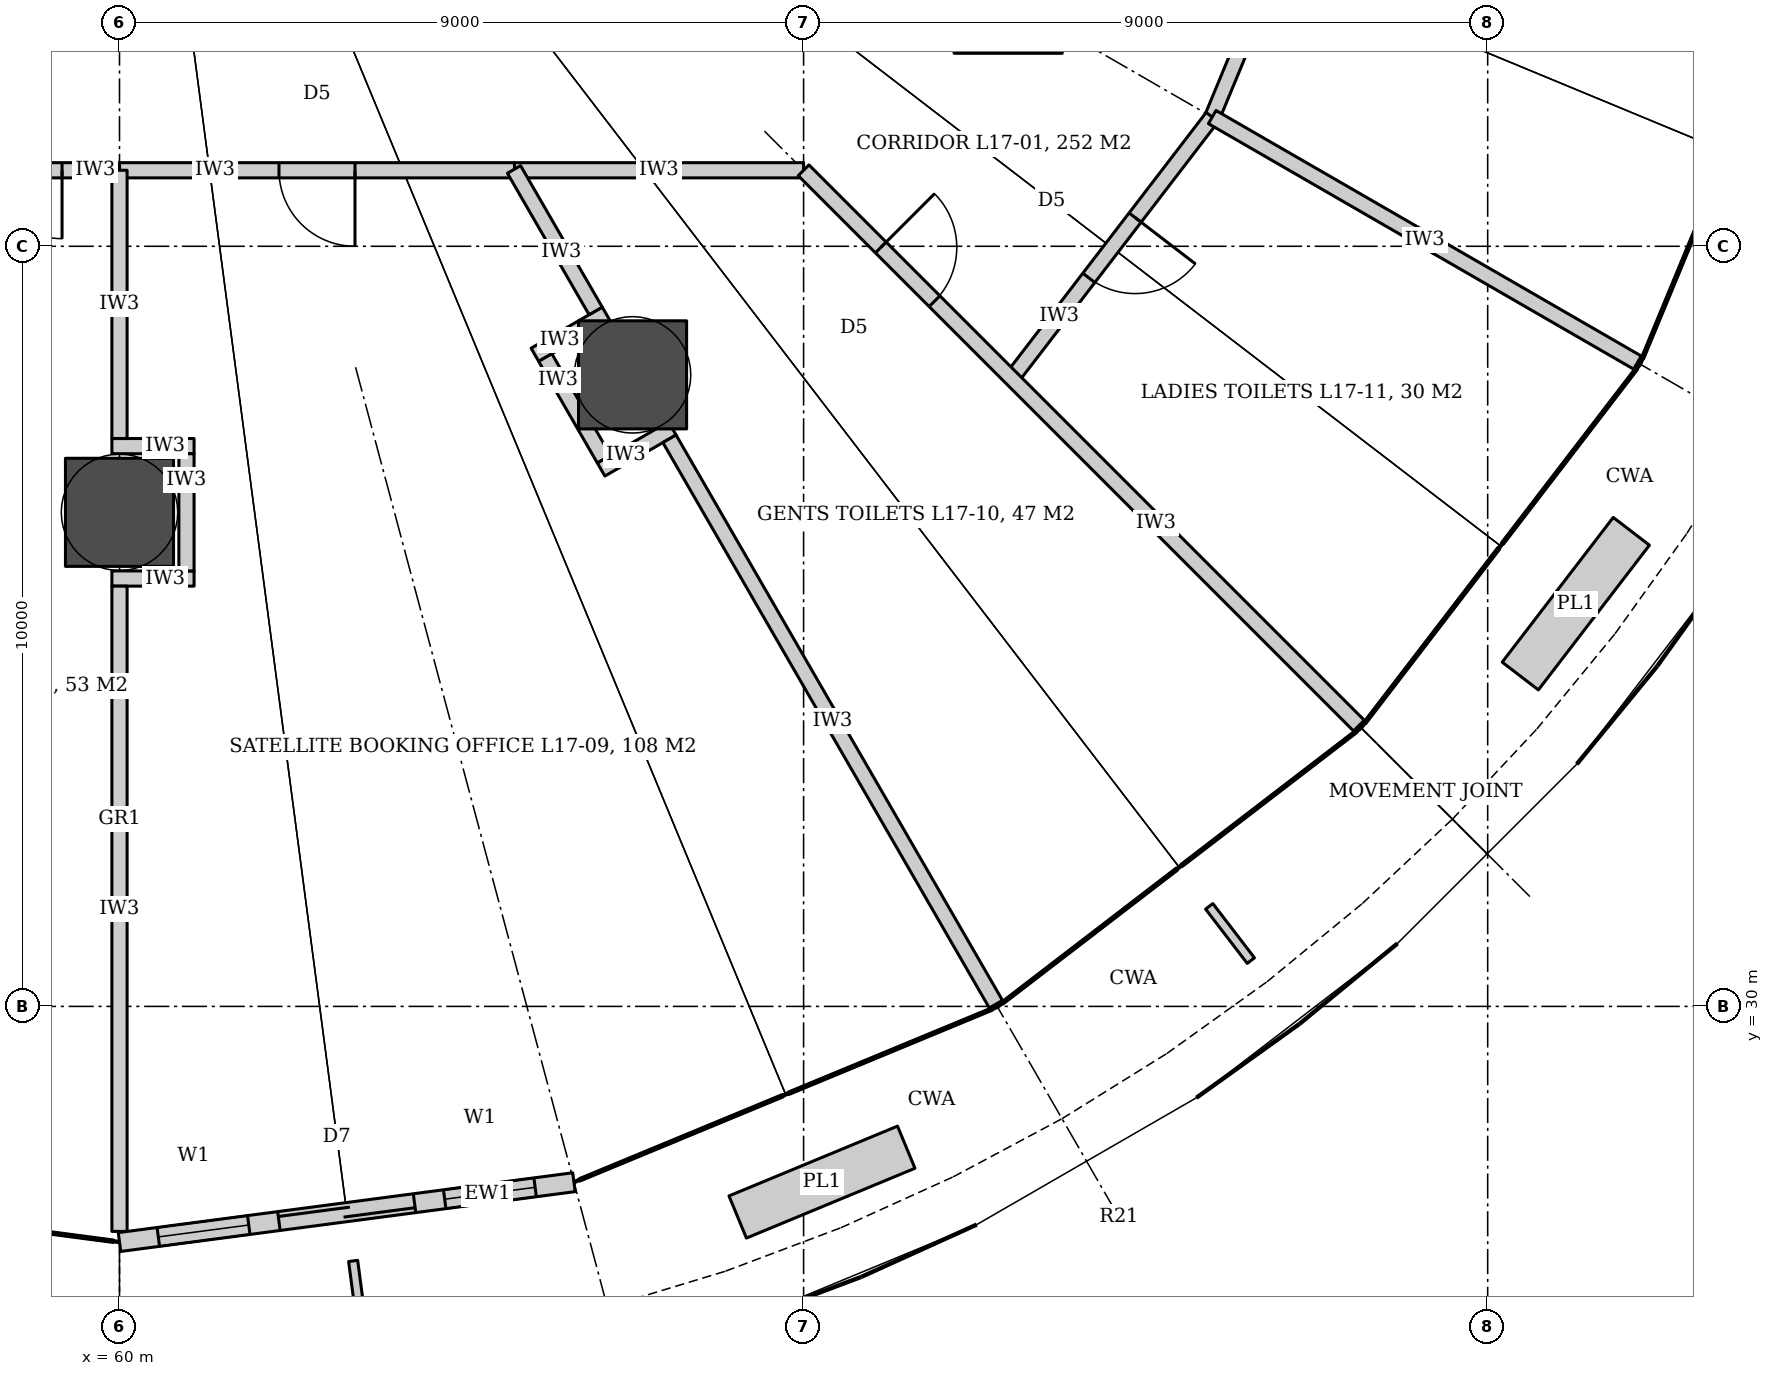
"""IFC4 building model, lengths in metres.
Left out: names, types, materials, properties, quantities, classifications, styles, units other than length and angle.
Written with IfcOpenShell. Run it as: python <this file> out.ifc"""

import sys

from ifc_helpers import new_model, si_unit, direction, frame, frame_2d, origin, origin_2d, place, context, subcontext, project, spatial, rectangle, hollow_circle, extrude, element, fill, save


model = new_model("IFC4")
c1 = context("Model", 3, precision=1e-05, world=origin(), true_north=direction((0.0, 1.0)))
c2 = subcontext(c1, "Body", "Model", "MODEL_VIEW")
j1 = project(units=[si_unit("LENGTHUNIT", "METRE"), si_unit("PLANEANGLEUNIT", "RADIAN")], contexts=[c1])
p1 = place(None, origin())
s1 = spatial("IfcSite", under=j1, at=p1, CompositionType="ELEMENT")
p2 = place(p1, origin())
s2 = spatial("IfcBuilding", under=s1, at=p2, CompositionType="ELEMENT")
p3 = place(p2, frame((0.0, 0.0, 80.6)))
s3 = spatial("IfcBuildingStorey", under=s2, at=p3, CompositionType="ELEMENT", Elevation=80.6)
for number, where, z_axis, x_axis in (
    (1, (60.0, 36.5, 0.0), (0.0, 0.0, 1.0), (1.0, 0.0, 0.0)),
    (2, (66.75, 38.309, 0.0), (0.0, 0.0, 1.0), (1.0, 0.0, 0.0)),
    (3, (71.691, 43.25, 0.0), (0.0, 0.0, 1.0), (1.0, 0.0, 0.0)),
):
    element("IfcColumn", number, at=place(p3, frame(where, z_axis=z_axis, x_axis=x_axis)), inside=s3, PredefinedType="COLUMN", context=c2, shape_type="SweptSolid", body=[
        extrude(hollow_circle(Radius=0.711, WallThickness=0.07, at=origin_2d()), origin(), (0.0, 0.0, 1.0), 4.2),
    ])
p4 = place(p3, frame((76.034, 45.704, 0.0), z_axis=(0.0, 0.0, 1.0), x_axis=(-0.382698425325, -0.923873322082, 0.0)))
e4 = element("IfcWall", 4, at=p4, inside=s3, PredefinedType="PARTITIONING", context=c2, shape_type="SweptSolid", body=[
    extrude(rectangle(XDim=4.333, YDim=0.2, at=frame_2d((2.167, 0.0))), origin(), (0.0, 0.0, 1.0), 3.04),
])
p5 = place(p4, frame((1.667, 0.0, 0.0)))
e5 = element("IfcOpeningElement", 5, at=p5, cuts=e4, PredefinedType="OPENING", context=c2, shape_type="SweptSolid", body=[
    extrude(rectangle(XDim=1.0, YDim=2.1, at=frame_2d((0.5, 1.05))), frame((0.0, 0.11, 0.0), z_axis=(0.0, -1.0, 0.0), x_axis=(1.0, 0.0, 0.0)), (0.0, 0.0, 1.0), 0.22),
])
p6 = place(p3, frame((74.376, 41.7, 0.0), z_axis=(0.0, 0.0, 1.0), x_axis=(-0.60874374674, -0.79336690806, 0.0)))
e6 = element("IfcWall", 6, at=p6, inside=s3, PredefinedType="PARTITIONING", context=c2, shape_type="SweptSolid", body=[
    extrude(rectangle(XDim=4.333, YDim=0.2, at=frame_2d((2.167, 0.0))), origin(), (0.0, 0.0, 1.0), 3.04),
])
p7 = place(p6, frame((1.667, 0.0, 0.0)))
e7 = element("IfcOpeningElement", 7, at=p7, cuts=e6, PredefinedType="OPENING", context=c2, shape_type="SweptSolid", body=[
    extrude(rectangle(XDim=1.0, YDim=2.1, at=frame_2d((0.5, 1.05))), frame((0.0, 0.11, 0.0), z_axis=(0.0, -1.0, 0.0), x_axis=(1.0, 0.0, 0.0)), (0.0, 0.0, 1.0), 0.22),
])
p8 = place(p3, frame((69.0, 41.0, 0.0), z_axis=(0.0, 0.0, 1.0), x_axis=(-1.0, 0.0, 0.0)))
e8 = element("IfcWall", 8, at=p8, inside=s3, PredefinedType="PARTITIONING", context=c2, shape_type="SweptSolid", body=[
    extrude(rectangle(XDim=3.804, YDim=0.2, at=frame_2d((1.902, 0.0))), origin(), (0.0, 0.0, 1.0), 3.02),
])
p9 = place(p3, frame((65.196, 41.0, 0.0), z_axis=(0.0, 0.0, 1.0), x_axis=(-1.0, 0.0, 0.0)))
e9 = element("IfcWall", 9, at=p9, inside=s3, PredefinedType="PARTITIONING", context=c2, shape_type="SweptSolid", body=[
    extrude(rectangle(XDim=5.196, YDim=0.2, at=frame_2d((2.598, 0.0))), origin(), (0.0, 0.0, 1.0), 3.04),
])
p10 = place(p9, frame((2.098, 0.0, 0.0)))
e10 = element("IfcOpeningElement", 10, at=p10, cuts=e9, PredefinedType="OPENING", context=c2, shape_type="SweptSolid", body=[
    extrude(rectangle(XDim=1.0, YDim=2.1, at=frame_2d((0.5, 1.05))), frame((0.0, 0.11, 0.0), z_axis=(0.0, -1.0, 0.0), x_axis=(1.0, 0.0, 0.0)), (0.0, 0.0, 1.0), 0.22),
])
p11 = place(p3, frame((60.0, 41.0, 0.0), z_axis=(0.0, 0.0, 1.0), x_axis=(-1.0, 0.0, 0.0)))
e11 = element("IfcWall", 11, at=p11, inside=s3, PredefinedType="PARTITIONING", context=c2, shape_type="SweptSolid", body=[
    extrude(rectangle(XDim=2.412, YDim=0.2, at=frame_2d((1.206, 0.0))), origin(), (0.0, 0.0, 1.0), 3.04),
])
p12 = place(p11, frame((0.756, 0.0, 0.0)))
e12 = element("IfcOpeningElement", 12, at=p12, cuts=e11, PredefinedType="OPENING", context=c2, shape_type="SweptSolid", body=[
    extrude(rectangle(XDim=0.9, YDim=2.4, at=frame_2d((0.45, 1.2))), frame((0.0, 0.11, 0.0), z_axis=(0.0, -1.0, 0.0), x_axis=(1.0, 0.0, 0.0)), (0.0, 0.0, 1.0), 0.22),
])
for number, where, z_axis, x_axis in (
    (13, (59.9, 37.371, 0.0), (0.0, 0.0, 1.0), (1.0, 0.0, 0.0)),
    (14, (59.9, 35.629, 0.0), (0.0, 0.0, 1.0), (1.0, 0.0, 0.0)),
):
    element("IfcWall", number, at=place(p3, frame(where, z_axis=z_axis, x_axis=x_axis)), inside=s3, PredefinedType="PARTITIONING", context=c2, shape_type="SweptSolid", body=[
        extrude(rectangle(XDim=1.081, YDim=0.2, at=frame_2d((0.541, 0.0))), origin(), (0.0, 0.0, 1.0), 3.02),
    ])
p13 = place(p3, frame((60.881, 37.271, 0.0), z_axis=(0.0, 0.0, 1.0), x_axis=(0.0, -1.0, 0.0)))
e15 = element("IfcWall", 15, at=p13, inside=s3, PredefinedType="PARTITIONING", context=c2, shape_type="SweptSolid", body=[
    extrude(rectangle(XDim=1.542, YDim=0.2, at=frame_2d((0.771, 0.0))), origin(), (0.0, 0.0, 1.0), 3.02),
])
p14 = place(p3, frame((60.0, 41.0, 0.0), z_axis=(0.0, 0.0, 1.0), x_axis=(0.0, -1.0, 0.0)))
e16 = element("IfcWall", 16, at=p14, inside=s3, PredefinedType="PARTITIONING", context=c2, shape_type="SweptSolid", body=[
    extrude(rectangle(XDim=3.529, YDim=0.2, at=frame_2d((1.765, 0.0))), origin(), (0.0, 0.0, 1.0), 3.04),
])
p15 = place(p3, frame((60.0, 35.529, 0.0), z_axis=(0.0, 0.0, 1.0), x_axis=(0.0, -1.0, 0.0)))
e17 = element("IfcWall", 17, at=p15, inside=s3, PredefinedType="PARTITIONING", context=c2, shape_type="SweptSolid", body=[
    extrude(rectangle(XDim=8.489, YDim=0.2, at=frame_2d((4.245, 0.0))), origin(), (0.0, 0.0, 1.0), 3.04),
])
for number, where, z_axis, x_axis in (
    (18, (66.401, 39.113, 0.0), (0.0, 0.0, 1.0), (-0.866, -0.5, 0.0)),
    (19, (67.272, 37.604, 0.0), (0.0, 0.0, 1.0), (-0.866, -0.5, 0.0)),
):
    element("IfcWall", number, at=place(p3, frame(where, z_axis=z_axis, x_axis=x_axis)), inside=s3, PredefinedType="PARTITIONING", context=c2, shape_type="SweptSolid", body=[
        extrude(rectangle(XDim=1.081, YDim=0.2, at=frame_2d((0.541, 0.0))), origin(), (0.0, 0.0, 1.0), 3.02),
    ])
p16 = place(p3, frame((65.602, 38.536, 0.0), z_axis=(0.0, 0.0, 1.0), x_axis=(0.499987416453, -0.866032668777, 0.0)))
e20 = element("IfcWall", 20, at=p16, inside=s3, PredefinedType="PARTITIONING", context=c2, shape_type="SweptSolid", body=[
    extrude(rectangle(XDim=1.542, YDim=0.2, at=frame_2d((0.771, 0.0))), origin(), (0.0, 0.0, 1.0), 3.02),
])
p17 = place(p3, frame((65.19, 41.011, 0.0), z_axis=(0.0, 0.0, 1.0), x_axis=(0.499987977232, -0.866032345022, 0.0)))
e21 = element("IfcWall", 21, at=p17, inside=s3, PredefinedType="PARTITIONING", context=c2, shape_type="SweptSolid", body=[
    extrude(rectangle(XDim=2.149, YDim=0.2, at=frame_2d((1.074, 0.0))), origin(), (0.0, 0.0, 1.0), 3.04),
])
p18 = place(p3, frame((67.236, 37.468, 0.0), z_axis=(0.0, 0.0, 1.0), x_axis=(0.499997214665, -0.866027011893, 0.0)))
e22 = element("IfcWall", 22, at=p18, inside=s3, PredefinedType="PARTITIONING", context=c2, shape_type="SweptSolid", body=[
    extrude(rectangle(XDim=8.589, YDim=0.2, at=frame_2d((4.294, 0.0))), origin(), (0.0, 0.0, 1.0), 3.04),
])
p19 = place(p3, frame((69.0, 41.0, 0.0), z_axis=(0.0, 0.0, 1.0), x_axis=(0.707106781187, -0.707106781187, 0.0)))
e23 = element("IfcWall", 23, at=p19, inside=s3, PredefinedType="PARTITIONING", context=c2, shape_type="SweptSolid", body=[
    extrude(rectangle(XDim=10.332, YDim=0.2, at=frame_2d((5.166, 0.0))), origin(), (0.0, 0.0, 1.0), 3.02),
])
p20 = place(p19, frame((1.436, 0.0, 0.0)))
e24 = element("IfcOpeningElement", 24, at=p20, cuts=e23, PredefinedType="OPENING", context=c2, shape_type="SweptSolid", body=[
    extrude(rectangle(XDim=1.0, YDim=2.1, at=frame_2d((0.5, 1.05))), frame((0.0, 0.11, 0.0), z_axis=(0.0, -1.0, 0.0), x_axis=(1.0, 0.0, 0.0)), (0.0, 0.0, 1.0), 0.22),
])
p21 = place(p3, frame((74.376, 41.7, 0.0), z_axis=(0.0, 0.0, 1.0), x_axis=(0.866025099701, -0.500000526688, 0.0)))
e25 = element("IfcWall", 25, at=p21, inside=s3, PredefinedType="PARTITIONING", context=c2, shape_type="SweptSolid", body=[
    extrude(rectangle(XDim=6.46, YDim=0.2, at=frame_2d((3.23, 0.0))), origin(), (0.0, 0.0, 1.0), 3.04),
])
p22 = place(p3, frame((60.0, 26.9, 0.0), z_axis=(0.0, 0.0, 1.0), x_axis=(0.991445060532, 0.130524679454, 0.0)))
e26 = element("IfcWall", 26, at=p22, inside=s3, PredefinedType="SOLIDWALL", context=c2, shape_type="SweptSolid", body=[
    extrude(rectangle(XDim=6.03, YDim=0.25, at=frame_2d((3.015, 0.0))), origin(), (0.0, 0.0, 1.0), 4.04),
])
p23 = place(p22, frame((2.115, 0.0, 0.0)))
e27 = element("IfcOpeningElement", 27, at=p23, cuts=e26, PredefinedType="OPENING", context=c2, shape_type="SweptSolid", body=[
    extrude(rectangle(XDim=1.8, YDim=2.4, at=frame_2d((0.9, 1.2))), frame((0.0, 0.135, 0.0), z_axis=(0.0, -1.0, 0.0), x_axis=(1.0, 0.0, 0.0)), (0.0, 0.0, 1.0), 0.27),
])
p24 = place(p22, frame((0.515, 0.0, 0.0)))
e28 = element("IfcOpeningElement", 28, at=p24, cuts=e26, PredefinedType="OPENING", context=c2, shape_type="SweptSolid", body=[
    extrude(rectangle(XDim=1.2, YDim=2.4, at=frame_2d((0.6, 1.2))), frame((0.0, 0.135, 0.0), z_axis=(0.0, -1.0, 0.0), x_axis=(1.0, 0.0, 0.0)), (0.0, 0.0, 1.0), 0.27),
])
p25 = place(p22, frame((4.315, 0.0, 0.0)))
e29 = element("IfcOpeningElement", 29, at=p25, cuts=e26, PredefinedType="OPENING", context=c2, shape_type="SweptSolid", body=[
    extrude(rectangle(XDim=1.2, YDim=2.4, at=frame_2d((0.6, 1.2))), frame((0.0, 0.135, 0.0), z_axis=(0.0, -1.0, 0.0), x_axis=(1.0, 0.0, 0.0)), (0.0, 0.0, 1.0), 0.27),
])
p26 = place(p12, origin())
e30 = element("IfcDoor", 30, at=p26, inside=s3, OperationType="SINGLE_SWING_LEFT", PredefinedType="DOOR", context=c2, shape_type="SweptSolid", body=[
    extrude(rectangle(XDim=0.9, YDim=2.4, at=frame_2d((0.45, 1.2))), frame((0.0, 0.025, 0.0), z_axis=(0.0, -1.0, 0.0), x_axis=(1.0, 0.0, 0.0)), (0.0, 0.0, 1.0), 0.05),
])
fill(e12, e30)
p27 = place(p10, origin())
e31 = element("IfcDoor", 31, at=p27, inside=s3, OperationType="SINGLE_SWING_LEFT", PredefinedType="DOOR", context=c2, shape_type="SweptSolid", body=[
    extrude(rectangle(XDim=1.0, YDim=2.1, at=frame_2d((0.5, 1.05))), frame((0.0, 0.025, 0.0), z_axis=(0.0, -1.0, 0.0), x_axis=(1.0, 0.0, 0.0)), (0.0, 0.0, 1.0), 0.05),
])
fill(e10, e31)
p28 = place(p20, origin())
e32 = element("IfcDoor", 32, at=p28, inside=s3, OperationType="SINGLE_SWING_LEFT", PredefinedType="DOOR", context=c2, shape_type="SweptSolid", body=[
    extrude(rectangle(XDim=1.0, YDim=2.1, at=frame_2d((0.5, 1.05))), frame((0.0, 0.025, 0.0), z_axis=(0.0, -1.0, 0.0), x_axis=(1.0, 0.0, 0.0)), (0.0, 0.0, 1.0), 0.05),
])
fill(e24, e32)
p29 = place(p7, origin())
e33 = element("IfcDoor", 33, at=p29, inside=s3, OperationType="SINGLE_SWING_LEFT", PredefinedType="DOOR", context=c2, shape_type="SweptSolid", body=[
    extrude(rectangle(XDim=1.0, YDim=2.1, at=frame_2d((0.5, 1.05))), frame((0.0, 0.025, 0.0), z_axis=(0.0, -1.0, 0.0), x_axis=(1.0, 0.0, 0.0)), (0.0, 0.0, 1.0), 0.05),
])
fill(e7, e33)
p30 = place(p23, origin())
e34 = element("IfcDoor", 34, at=p30, inside=s3, OperationType="DOUBLE_DOOR_SLIDING", PredefinedType="DOOR", context=c2, shape_type="SweptSolid", body=[
    extrude(rectangle(XDim=1.8, YDim=2.4, at=frame_2d((0.9, 1.2))), frame((0.0, 0.025, 0.0), z_axis=(0.0, -1.0, 0.0), x_axis=(1.0, 0.0, 0.0)), (0.0, 0.0, 1.0), 0.05),
])
fill(e27, e34)
p31 = place(p24, origin())
e35 = element("IfcWindow", 35, at=p31, inside=s3, PartitioningType="SINGLE_PANEL", PredefinedType="WINDOW", context=c2, shape_type="SweptSolid", body=[
    extrude(rectangle(XDim=1.2, YDim=2.4, at=frame_2d((0.6, 1.2))), frame((0.0, 0.03, 0.0), z_axis=(0.0, -1.0, 0.0), x_axis=(1.0, 0.0, 0.0)), (0.0, 0.0, 1.0), 0.06),
])
fill(e28, e35)
p32 = place(p25, origin())
e36 = element("IfcWindow", 36, at=p32, inside=s3, PartitioningType="SINGLE_PANEL", PredefinedType="WINDOW", context=c2, shape_type="SweptSolid", body=[
    extrude(rectangle(XDim=1.2, YDim=2.4, at=frame_2d((0.6, 1.2))), frame((0.0, 0.03, 0.0), z_axis=(0.0, -1.0, 0.0), x_axis=(1.0, 0.0, 0.0)), (0.0, 0.0, 1.0), 0.06),
])
fill(e29, e36)
save(model, sys.argv[1])
